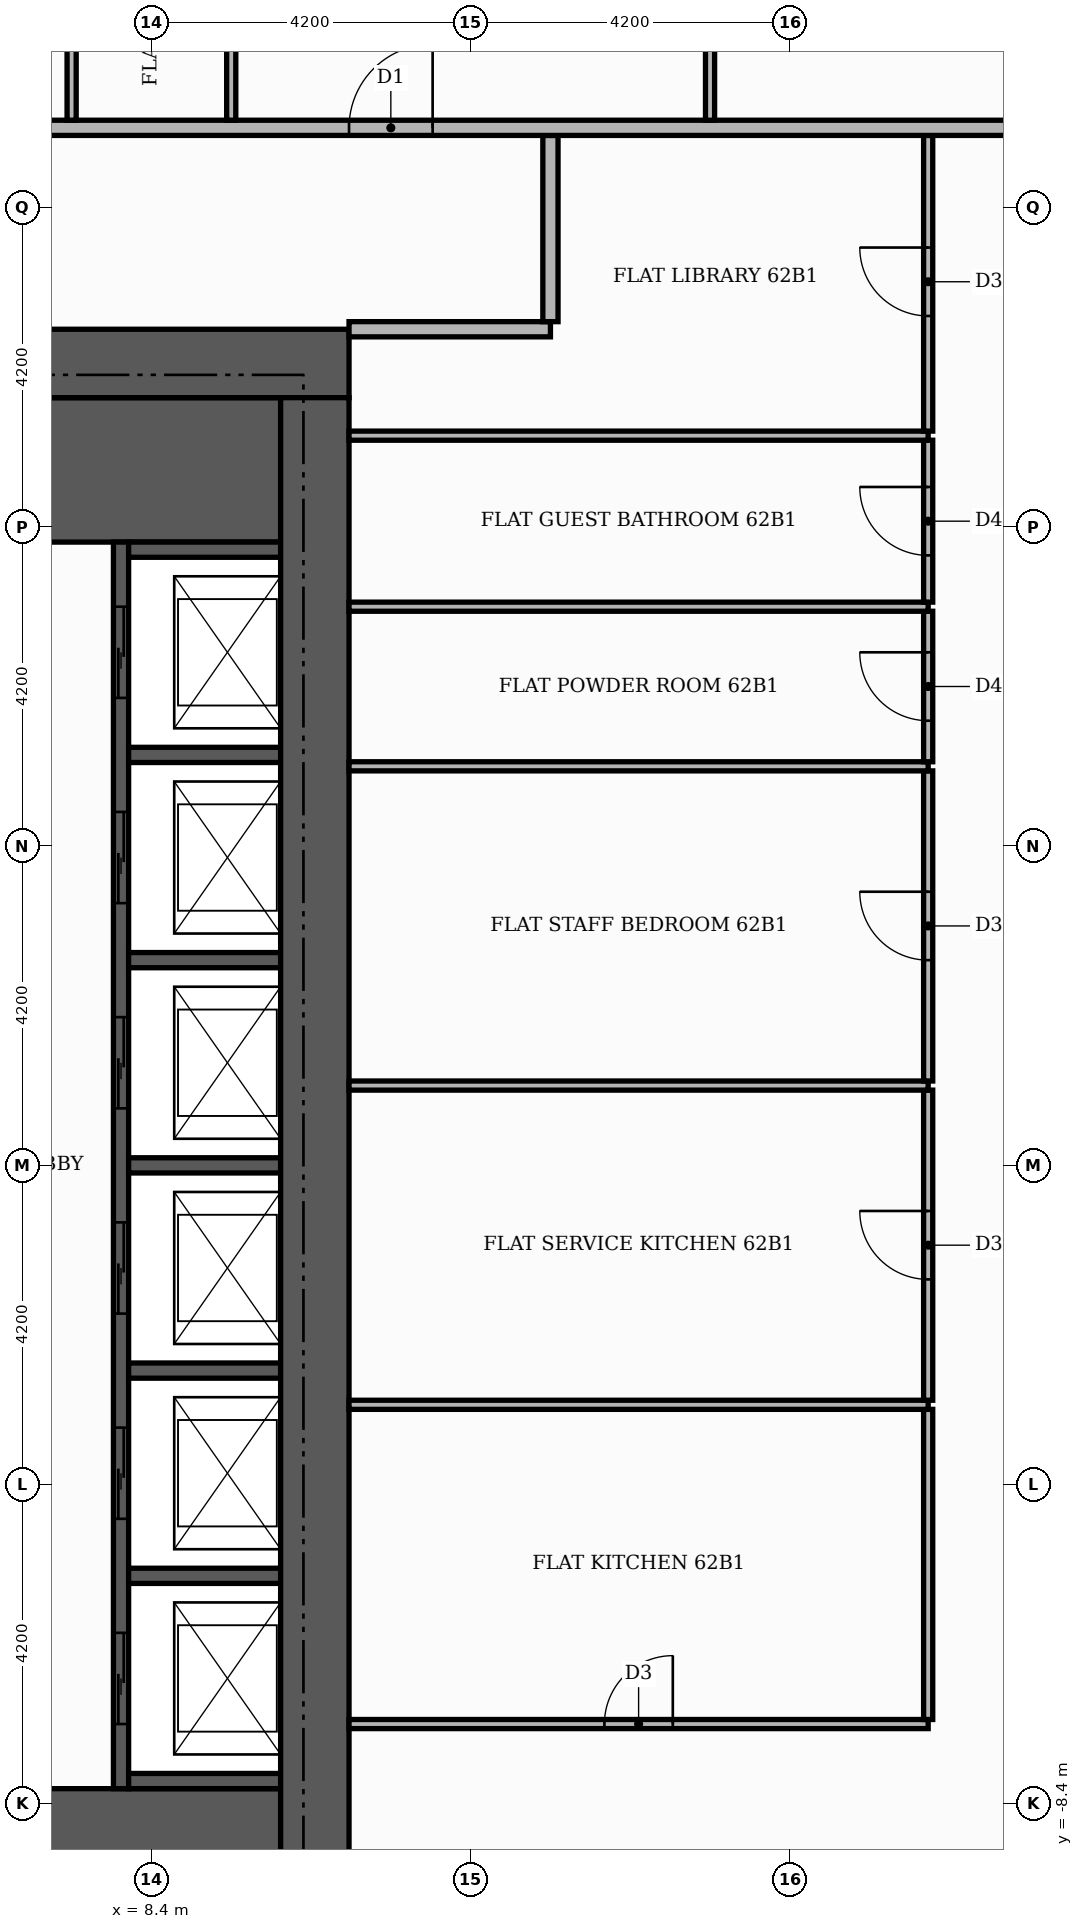
"""IFC4 building model, lengths in metres.
Left out: names, types, materials, properties, quantities, classifications, styles, units other than length and angle.
Written with IfcOpenShell. Run it as: python <this file> out.ifc"""

import sys

from ifc_helpers import new_model, si_unit, direction, frame, frame_2d, origin, place, context, subcontext, project, spatial, rectangle, extrude, element, fill, save


model = new_model("IFC4")
c1 = context("Model", 3, precision=1e-05, world=origin(), true_north=direction((0.0, 1.0)))
c2 = subcontext(c1, "Body", "Model", "MODEL_VIEW")
j1 = project(units=[si_unit("LENGTHUNIT", "METRE"), si_unit("PLANEANGLEUNIT", "RADIAN")], contexts=[c1])
p1 = place(None, origin())
s1 = spatial("IfcSite", under=j1, at=p1, CompositionType="ELEMENT")
p2 = place(p1, origin())
s2 = spatial("IfcBuilding", under=s1, at=p2, CompositionType="ELEMENT")
p3 = place(p2, frame((0.0, 0.0, 260.1)))
s3 = spatial("IfcBuildingStorey", under=s2, at=p3, CompositionType="ELEMENT", Elevation=260.1)
for number, where, z_axis, x_axis in (
    (1, (5.5, -9.15, 0.0), (0.0, 0.0, 1.0), (1.0, 0.0, 0.0)),
    (2, (5.5, 9.15, 0.0), (0.0, 0.0, 1.0), (1.0, 0.0, 0.0)),
):
    element("IfcWall", number, at=place(p3, frame(where, z_axis=z_axis, x_axis=x_axis)), inside=s3, PredefinedType="SHEAR", context=c2, shape_type="SweptSolid", body=[
        extrude(rectangle(XDim=4.6, YDim=1.9, at=frame_2d((2.3, 0.0))), origin(), (0.0, 0.0, 1.0), 3.48),
    ])
p4 = place(p3, frame((8.0, -8.2, 0.0), z_axis=(0.0, 0.0, 1.0), x_axis=(0.0, 1.0, 0.0)))
e3 = element("IfcWall", 3, at=p4, inside=s3, PredefinedType="SHEAR", context=c2, shape_type="SweptSolid", body=[
    extrude(rectangle(XDim=16.4, YDim=0.2, at=frame_2d((8.2, 0.0))), origin(), (0.0, 0.0, 1.0), 3.48),
])
p5 = place(p4, frame((0.85, 0.0, 0.0)))
e4 = element("IfcOpeningElement", 4, at=p5, cuts=e3, PredefinedType="OPENING", context=c2, shape_type="SweptSolid", body=[
    extrude(rectangle(XDim=1.2, YDim=2.1, at=frame_2d((0.6, 1.05))), frame((0.0, 0.11, 0.0), z_axis=(0.0, -1.0, 0.0), x_axis=(1.0, 0.0, 0.0)), (0.0, 0.0, 1.0), 0.22),
])
p6 = place(p4, frame((3.55, 0.0, 0.0)))
e5 = element("IfcOpeningElement", 5, at=p6, cuts=e3, PredefinedType="OPENING", context=c2, shape_type="SweptSolid", body=[
    extrude(rectangle(XDim=1.2, YDim=2.1, at=frame_2d((0.6, 1.05))), frame((0.0, 0.11, 0.0), z_axis=(0.0, -1.0, 0.0), x_axis=(1.0, 0.0, 0.0)), (0.0, 0.0, 1.0), 0.22),
])
p7 = place(p4, frame((6.25, 0.0, 0.0)))
e6 = element("IfcOpeningElement", 6, at=p7, cuts=e3, PredefinedType="OPENING", context=c2, shape_type="SweptSolid", body=[
    extrude(rectangle(XDim=1.2, YDim=2.1, at=frame_2d((0.6, 1.05))), frame((0.0, 0.11, 0.0), z_axis=(0.0, -1.0, 0.0), x_axis=(1.0, 0.0, 0.0)), (0.0, 0.0, 1.0), 0.22),
])
p8 = place(p4, frame((8.95, 0.0, 0.0)))
e7 = element("IfcOpeningElement", 7, at=p8, cuts=e3, PredefinedType="OPENING", context=c2, shape_type="SweptSolid", body=[
    extrude(rectangle(XDim=1.2, YDim=2.1, at=frame_2d((0.6, 1.05))), frame((0.0, 0.11, 0.0), z_axis=(0.0, -1.0, 0.0), x_axis=(1.0, 0.0, 0.0)), (0.0, 0.0, 1.0), 0.22),
])
p9 = place(p4, frame((11.65, 0.0, 0.0)))
e8 = element("IfcOpeningElement", 8, at=p9, cuts=e3, PredefinedType="OPENING", context=c2, shape_type="SweptSolid", body=[
    extrude(rectangle(XDim=1.2, YDim=2.1, at=frame_2d((0.6, 1.05))), frame((0.0, 0.11, 0.0), z_axis=(0.0, -1.0, 0.0), x_axis=(1.0, 0.0, 0.0)), (0.0, 0.0, 1.0), 0.22),
])
p10 = place(p4, frame((14.35, 0.0, 0.0)))
e9 = element("IfcOpeningElement", 9, at=p10, cuts=e3, PredefinedType="OPENING", context=c2, shape_type="SweptSolid", body=[
    extrude(rectangle(XDim=1.2, YDim=2.1, at=frame_2d((0.6, 1.05))), frame((0.0, 0.11, 0.0), z_axis=(0.0, -1.0, 0.0), x_axis=(1.0, 0.0, 0.0)), (0.0, 0.0, 1.0), 0.22),
])
for number, where, z_axis, x_axis in (
    (10, (8.1, -8.1, 0.0), (0.0, 0.0, 1.0), (1.0, 0.0, 0.0)),
    (11, (8.1, -5.4, 0.0), (0.0, 0.0, 1.0), (1.0, 0.0, 0.0)),
    (12, (8.1, -2.7, 0.0), (0.0, 0.0, 1.0), (1.0, 0.0, 0.0)),
    (13, (8.1, 0.0, 0.0), (0.0, 0.0, 1.0), (1.0, 0.0, 0.0)),
    (14, (8.1, 2.7, 0.0), (0.0, 0.0, 1.0), (1.0, 0.0, 0.0)),
    (15, (8.1, 5.4, 0.0), (0.0, 0.0, 1.0), (1.0, 0.0, 0.0)),
    (16, (8.1, 8.1, 0.0), (0.0, 0.0, 1.0), (1.0, 0.0, 0.0)),
):
    element("IfcWall", number, at=place(p3, frame(where, z_axis=z_axis, x_axis=x_axis)), inside=s3, PredefinedType="SHEAR", context=c2, shape_type="SweptSolid", body=[
        extrude(rectangle(XDim=2.0, YDim=0.2, at=frame_2d((1.0, 0.0))), origin(), (0.0, 0.0, 1.0), 3.48),
    ])
p11 = place(p3, frame((-11.0, 10.55, 0.0), z_axis=(0.0, 0.0, 1.0), x_axis=(1.0, 0.0, 0.0)))
e17 = element("IfcWall", 17, at=p11, inside=s3, PredefinedType="SHEAR", context=c2, shape_type="SweptSolid", body=[
    extrude(rectangle(XDim=22.0, YDim=0.9, at=frame_2d((11.0, 0.0))), origin(), (0.0, 0.0, 1.0), 3.48),
])
p12 = place(p11, frame((13.3, 0.0, 0.0)))
e18 = element("IfcOpeningElement", 18, at=p12, cuts=e17, PredefinedType="OPENING", context=c2, shape_type="SweptSolid", body=[
    extrude(rectangle(XDim=1.8, YDim=2.2, at=frame_2d((0.9, 1.1))), frame((0.0, 0.46, 0.0), z_axis=(0.0, -1.0, 0.0), x_axis=(1.0, 0.0, 0.0)), (0.0, 0.0, 1.0), 0.92),
])
p13 = place(p3, frame((10.55, -10.1, 0.0), z_axis=(0.0, 0.0, 1.0), x_axis=(0.0, 1.0, 0.0)))
e19 = element("IfcWall", 19, at=p13, inside=s3, PredefinedType="SHEAR", context=c2, shape_type="SweptSolid", body=[
    extrude(rectangle(XDim=20.2, YDim=0.9, at=frame_2d((10.1, 0.0))), origin(), (0.0, 0.0, 1.0), 3.48),
])
p14 = place(p3, frame((11.0, -7.35, 0.0), z_axis=(0.0, 0.0, 1.0), x_axis=(1.0, 0.0, 0.0)))
e20 = element("IfcWall", 20, at=p14, inside=s3, PredefinedType="PARTITIONING", context=c2, shape_type="SweptSolid", body=[
    extrude(rectangle(XDim=7.62, YDim=0.12, at=frame_2d((3.81, 0.0))), origin(), (0.0, 0.0, 1.0), 3.48),
])
p15 = place(p14, frame((3.36, 0.0, 0.0)))
e21 = element("IfcOpeningElement", 21, at=p15, cuts=e20, PredefinedType="OPENING", context=c2, shape_type="SweptSolid", body=[
    extrude(rectangle(XDim=0.9, YDim=2.1, at=frame_2d((0.45, 1.05))), frame((0.0, 0.07, 0.0), z_axis=(0.0, -1.0, 0.0), x_axis=(1.0, 0.0, 0.0)), (0.0, 0.0, 1.0), 0.14),
])
p16 = place(p3, frame((18.62, -7.29, 0.0), z_axis=(0.0, 0.0, 1.0), x_axis=(0.0, 1.0, 0.0)))
e22 = element("IfcWall", 22, at=p16, inside=s3, PredefinedType="PARTITIONING", context=c2, shape_type="SweptSolid", body=[
    extrude(rectangle(XDim=4.08, YDim=0.12, at=frame_2d((2.04, 0.0))), origin(), (0.0, 0.0, 1.0), 3.48),
])
p17 = place(p3, frame((11.0, -3.15, 0.0), z_axis=(0.0, 0.0, 1.0), x_axis=(1.0, 0.0, 0.0)))
e23 = element("IfcWall", 23, at=p17, inside=s3, PredefinedType="PARTITIONING", context=c2, shape_type="SweptSolid", body=[
    extrude(rectangle(XDim=7.62, YDim=0.12, at=frame_2d((3.81, 0.0))), origin(), (0.0, 0.0, 1.0), 3.48),
])
p18 = place(p3, frame((18.62, -3.09, 0.0), z_axis=(0.0, 0.0, 1.0), x_axis=(0.0, 1.0, 0.0)))
e24 = element("IfcWall", 24, at=p18, inside=s3, PredefinedType="PARTITIONING", context=c2, shape_type="SweptSolid", body=[
    extrude(rectangle(XDim=4.08, YDim=0.12, at=frame_2d((2.04, 0.0))), origin(), (0.0, 0.0, 1.0), 3.48),
])
p19 = place(p18, frame((1.59, 0.0, 0.0)))
e25 = element("IfcOpeningElement", 25, at=p19, cuts=e24, PredefinedType="OPENING", context=c2, shape_type="SweptSolid", body=[
    extrude(rectangle(XDim=0.9, YDim=2.1, at=frame_2d((0.45, 1.05))), frame((0.0, 0.07, 0.0), z_axis=(0.0, -1.0, 0.0), x_axis=(1.0, 0.0, 0.0)), (0.0, 0.0, 1.0), 0.14),
])
p20 = place(p3, frame((11.0, 1.05, 0.0), z_axis=(0.0, 0.0, 1.0), x_axis=(1.0, 0.0, 0.0)))
e26 = element("IfcWall", 26, at=p20, inside=s3, PredefinedType="PARTITIONING", context=c2, shape_type="SweptSolid", body=[
    extrude(rectangle(XDim=7.62, YDim=0.12, at=frame_2d((3.81, 0.0))), origin(), (0.0, 0.0, 1.0), 3.48),
])
p21 = place(p3, frame((18.62, 1.11, 0.0), z_axis=(0.0, 0.0, 1.0), x_axis=(0.0, 1.0, 0.0)))
e27 = element("IfcWall", 27, at=p21, inside=s3, PredefinedType="PARTITIONING", context=c2, shape_type="SweptSolid", body=[
    extrude(rectangle(XDim=4.08, YDim=0.12, at=frame_2d((2.04, 0.0))), origin(), (0.0, 0.0, 1.0), 3.48),
])
p22 = place(p21, frame((1.59, 0.0, 0.0)))
e28 = element("IfcOpeningElement", 28, at=p22, cuts=e27, PredefinedType="OPENING", context=c2, shape_type="SweptSolid", body=[
    extrude(rectangle(XDim=0.9, YDim=2.1, at=frame_2d((0.45, 1.05))), frame((0.0, 0.07, 0.0), z_axis=(0.0, -1.0, 0.0), x_axis=(1.0, 0.0, 0.0)), (0.0, 0.0, 1.0), 0.14),
])
p23 = place(p3, frame((11.0, 5.25, 0.0), z_axis=(0.0, 0.0, 1.0), x_axis=(1.0, 0.0, 0.0)))
e29 = element("IfcWall", 29, at=p23, inside=s3, PredefinedType="PARTITIONING", context=c2, shape_type="SweptSolid", body=[
    extrude(rectangle(XDim=7.62, YDim=0.12, at=frame_2d((3.81, 0.0))), origin(), (0.0, 0.0, 1.0), 3.48),
])
p24 = place(p3, frame((18.62, 5.31, 0.0), z_axis=(0.0, 0.0, 1.0), x_axis=(0.0, 1.0, 0.0)))
e30 = element("IfcWall", 30, at=p24, inside=s3, PredefinedType="PARTITIONING", context=c2, shape_type="SweptSolid", body=[
    extrude(rectangle(XDim=1.98, YDim=0.12, at=frame_2d((0.99, 0.0))), origin(), (0.0, 0.0, 1.0), 3.48),
])
p25 = place(p24, frame((0.54, 0.0, 0.0)))
e31 = element("IfcOpeningElement", 31, at=p25, cuts=e30, PredefinedType="OPENING", context=c2, shape_type="SweptSolid", body=[
    extrude(rectangle(XDim=0.9, YDim=2.1, at=frame_2d((0.45, 1.05))), frame((0.0, 0.07, 0.0), z_axis=(0.0, -1.0, 0.0), x_axis=(1.0, 0.0, 0.0)), (0.0, 0.0, 1.0), 0.14),
])
p26 = place(p3, frame((11.0, 7.35, 0.0), z_axis=(0.0, 0.0, 1.0), x_axis=(1.0, 0.0, 0.0)))
e32 = element("IfcWall", 32, at=p26, inside=s3, PredefinedType="PARTITIONING", context=c2, shape_type="SweptSolid", body=[
    extrude(rectangle(XDim=7.62, YDim=0.12, at=frame_2d((3.81, 0.0))), origin(), (0.0, 0.0, 1.0), 3.48),
])
p27 = place(p3, frame((18.62, 7.41, 0.0), z_axis=(0.0, 0.0, 1.0), x_axis=(0.0, 1.0, 0.0)))
e33 = element("IfcWall", 33, at=p27, inside=s3, PredefinedType="PARTITIONING", context=c2, shape_type="SweptSolid", body=[
    extrude(rectangle(XDim=2.13, YDim=0.12, at=frame_2d((1.065, 0.0))), origin(), (0.0, 0.0, 1.0), 3.48),
])
p28 = place(p27, frame((0.615, 0.0, 0.0)))
e34 = element("IfcOpeningElement", 34, at=p28, cuts=e33, PredefinedType="OPENING", context=c2, shape_type="SweptSolid", body=[
    extrude(rectangle(XDim=0.9, YDim=2.1, at=frame_2d((0.45, 1.05))), frame((0.0, 0.07, 0.0), z_axis=(0.0, -1.0, 0.0), x_axis=(1.0, 0.0, 0.0)), (0.0, 0.0, 1.0), 0.14),
])
p29 = place(p3, frame((11.0, 9.6, 0.0), z_axis=(0.0, 0.0, 1.0), x_axis=(1.0, 0.0, 0.0)))
e35 = element("IfcWall", 35, at=p29, inside=s3, PredefinedType="PARTITIONING", context=c2, shape_type="SweptSolid", body=[
    extrude(rectangle(XDim=7.62, YDim=0.12, at=frame_2d((3.81, 0.0))), origin(), (0.0, 0.0, 1.0), 3.48),
])
p30 = place(p3, frame((18.62, 9.66, 0.0), z_axis=(0.0, 0.0, 1.0), x_axis=(0.0, 1.0, 0.0)))
e36 = element("IfcWall", 36, at=p30, inside=s3, PredefinedType="PARTITIONING", context=c2, shape_type="SweptSolid", body=[
    extrude(rectangle(XDim=3.89, YDim=0.12, at=frame_2d((1.945, 0.0))), origin(), (0.0, 0.0, 1.0), 3.48),
])
p31 = place(p30, frame((1.515, 0.0, 0.0)))
e37 = element("IfcOpeningElement", 37, at=p31, cuts=e36, PredefinedType="OPENING", context=c2, shape_type="SweptSolid", body=[
    extrude(rectangle(XDim=0.9, YDim=2.1, at=frame_2d((0.45, 1.05))), frame((0.0, 0.07, 0.0), z_axis=(0.0, -1.0, 0.0), x_axis=(1.0, 0.0, 0.0)), (0.0, 0.0, 1.0), 0.14),
])
p32 = place(p3, frame((11.0, 11.0, 0.0), z_axis=(0.0, 0.0, 1.0), x_axis=(1.0, 0.0, 0.0)))
e38 = element("IfcWall", 38, at=p32, inside=s3, PredefinedType="PARTITIONING", context=c2, shape_type="SweptSolid", body=[
    extrude(rectangle(XDim=2.65, YDim=0.2, at=frame_2d((1.325, 0.0))), origin(), (0.0, 0.0, 1.0), 3.48),
])
p33 = place(p3, frame((13.65, 11.1, 0.0), z_axis=(0.0, 0.0, 1.0), x_axis=(0.0, 1.0, 0.0)))
e39 = element("IfcWall", 39, at=p33, inside=s3, PredefinedType="PARTITIONING", context=c2, shape_type="SweptSolid", body=[
    extrude(rectangle(XDim=2.45, YDim=0.2, at=frame_2d((1.225, 0.0))), origin(), (0.0, 0.0, 1.0), 3.48),
])
p34 = place(p3, frame((-13.65, 13.65, 0.0), z_axis=(0.0, 0.0, 1.0), x_axis=(1.0, 0.0, 0.0)))
e40 = element("IfcWall", 40, at=p34, inside=s3, PredefinedType="PARTITIONING", context=c2, shape_type="SweptSolid", body=[
    extrude(rectangle(XDim=39.07, YDim=0.2, at=frame_2d((19.535, 0.0))), origin(), (0.0, 0.0, 1.0), 3.48),
])
p35 = place(p34, frame((24.65, 0.0, 0.0)))
e41 = element("IfcOpeningElement", 41, at=p35, cuts=e40, PredefinedType="OPENING", context=c2, shape_type="SweptSolid", body=[
    extrude(rectangle(XDim=1.1, YDim=2.4, at=frame_2d((0.55, 1.2))), frame((0.0, 0.11, 0.0), z_axis=(0.0, -1.0, 0.0), x_axis=(1.0, 0.0, 0.0)), (0.0, 0.0, 1.0), 0.22),
])
p36 = place(p34, frame((14.15, 0.0, 0.0)))
e42 = element("IfcOpeningElement", 42, at=p36, cuts=e40, PredefinedType="OPENING", context=c2, shape_type="SweptSolid", body=[
    extrude(rectangle(XDim=1.1, YDim=2.4, at=frame_2d((0.55, 1.2))), frame((0.0, 0.11, 0.0), z_axis=(0.0, -1.0, 0.0), x_axis=(1.0, 0.0, 0.0)), (0.0, 0.0, 1.0), 0.22),
])
p37 = place(p3, frame((7.35, 13.75, 0.0), z_axis=(0.0, 0.0, 1.0), x_axis=(0.0, 1.0, 0.0)))
e43 = element("IfcWall", 43, at=p37, inside=s3, PredefinedType="PARTITIONING", context=c2, shape_type="SweptSolid", body=[
    extrude(rectangle(XDim=5.11, YDim=0.12, at=frame_2d((2.555, 0.0))), origin(), (0.0, 0.0, 1.0), 3.48),
])
p38 = place(p3, frame((9.45, 13.75, 0.0), z_axis=(0.0, 0.0, 1.0), x_axis=(0.0, 1.0, 0.0)))
e44 = element("IfcWall", 44, at=p38, inside=s3, PredefinedType="PARTITIONING", context=c2, shape_type="SweptSolid", body=[
    extrude(rectangle(XDim=5.11, YDim=0.12, at=frame_2d((2.555, 0.0))), origin(), (0.0, 0.0, 1.0), 3.48),
])
p39 = place(p38, frame((2.085, 0.0, 0.0)))
e45 = element("IfcOpeningElement", 45, at=p39, cuts=e44, PredefinedType="OPENING", context=c2, shape_type="SweptSolid", body=[
    extrude(rectangle(XDim=0.9, YDim=2.1, at=frame_2d((0.45, 1.05))), frame((0.0, 0.07, 0.0), z_axis=(0.0, -1.0, 0.0), x_axis=(1.0, 0.0, 0.0)), (0.0, 0.0, 1.0), 0.14),
])
p40 = place(p3, frame((15.75, 13.75, 0.0), z_axis=(0.0, 0.0, 1.0), x_axis=(0.0, 1.0, 0.0)))
e46 = element("IfcWall", 46, at=p40, inside=s3, PredefinedType="PARTITIONING", context=c2, shape_type="SweptSolid", body=[
    extrude(rectangle(XDim=6.61, YDim=0.12, at=frame_2d((3.305, 0.0))), origin(), (0.0, 0.0, 1.0), 3.48),
])
p41 = place(p40, frame((2.785, 0.0, 0.0)))
e47 = element("IfcOpeningElement", 47, at=p41, cuts=e46, PredefinedType="OPENING", context=c2, shape_type="SweptSolid", body=[
    extrude(rectangle(XDim=1.0, YDim=2.1, at=frame_2d((0.5, 1.05))), frame((0.0, 0.07, 0.0), z_axis=(0.0, -1.0, 0.0), x_axis=(1.0, 0.0, 0.0)), (0.0, 0.0, 1.0), 0.14),
])
p42 = place(p5, origin())
e48 = element("IfcDoor", 48, at=p42, inside=s3, OperationType="SLIDING_TO_LEFT", PredefinedType="DOOR", context=c2, shape_type="SweptSolid", body=[
    extrude(rectangle(XDim=1.2, YDim=2.1, at=frame_2d((0.6, 1.05))), frame((0.0, 0.025, 0.0), z_axis=(0.0, -1.0, 0.0), x_axis=(1.0, 0.0, 0.0)), (0.0, 0.0, 1.0), 0.05),
])
fill(e4, e48)
p43 = place(p6, origin())
e49 = element("IfcDoor", 49, at=p43, inside=s3, OperationType="SLIDING_TO_LEFT", PredefinedType="DOOR", context=c2, shape_type="SweptSolid", body=[
    extrude(rectangle(XDim=1.2, YDim=2.1, at=frame_2d((0.6, 1.05))), frame((0.0, 0.025, 0.0), z_axis=(0.0, -1.0, 0.0), x_axis=(1.0, 0.0, 0.0)), (0.0, 0.0, 1.0), 0.05),
])
fill(e5, e49)
p44 = place(p7, origin())
e50 = element("IfcDoor", 50, at=p44, inside=s3, OperationType="SLIDING_TO_LEFT", PredefinedType="DOOR", context=c2, shape_type="SweptSolid", body=[
    extrude(rectangle(XDim=1.2, YDim=2.1, at=frame_2d((0.6, 1.05))), frame((0.0, 0.025, 0.0), z_axis=(0.0, -1.0, 0.0), x_axis=(1.0, 0.0, 0.0)), (0.0, 0.0, 1.0), 0.05),
])
fill(e6, e50)
p45 = place(p8, origin())
e51 = element("IfcDoor", 51, at=p45, inside=s3, OperationType="SLIDING_TO_LEFT", PredefinedType="DOOR", context=c2, shape_type="SweptSolid", body=[
    extrude(rectangle(XDim=1.2, YDim=2.1, at=frame_2d((0.6, 1.05))), frame((0.0, 0.025, 0.0), z_axis=(0.0, -1.0, 0.0), x_axis=(1.0, 0.0, 0.0)), (0.0, 0.0, 1.0), 0.05),
])
fill(e7, e51)
p46 = place(p9, origin())
e52 = element("IfcDoor", 52, at=p46, inside=s3, OperationType="SLIDING_TO_LEFT", PredefinedType="DOOR", context=c2, shape_type="SweptSolid", body=[
    extrude(rectangle(XDim=1.2, YDim=2.1, at=frame_2d((0.6, 1.05))), frame((0.0, 0.025, 0.0), z_axis=(0.0, -1.0, 0.0), x_axis=(1.0, 0.0, 0.0)), (0.0, 0.0, 1.0), 0.05),
])
fill(e8, e52)
p47 = place(p10, origin())
e53 = element("IfcDoor", 53, at=p47, inside=s3, OperationType="SLIDING_TO_LEFT", PredefinedType="DOOR", context=c2, shape_type="SweptSolid", body=[
    extrude(rectangle(XDim=1.2, YDim=2.1, at=frame_2d((0.6, 1.05))), frame((0.0, 0.025, 0.0), z_axis=(0.0, -1.0, 0.0), x_axis=(1.0, 0.0, 0.0)), (0.0, 0.0, 1.0), 0.05),
])
fill(e9, e53)
p48 = place(p15, origin())
e54 = element("IfcDoor", 54, at=p48, inside=s3, OperationType="SINGLE_SWING_RIGHT", PredefinedType="DOOR", context=c2, shape_type="SweptSolid", body=[
    extrude(rectangle(XDim=0.9, YDim=2.1, at=frame_2d((0.45, 1.05))), frame((0.0, 0.025, 0.0), z_axis=(0.0, -1.0, 0.0), x_axis=(1.0, 0.0, 0.0)), (0.0, 0.0, 1.0), 0.05),
])
fill(e21, e54)
p49 = place(p19, origin())
e55 = element("IfcDoor", 55, at=p49, inside=s3, OperationType="SINGLE_SWING_RIGHT", PredefinedType="DOOR", context=c2, shape_type="SweptSolid", body=[
    extrude(rectangle(XDim=0.9, YDim=2.1, at=frame_2d((0.45, 1.05))), frame((0.0, 0.025, 0.0), z_axis=(0.0, -1.0, 0.0), x_axis=(1.0, 0.0, 0.0)), (0.0, 0.0, 1.0), 0.05),
])
fill(e25, e55)
p50 = place(p22, origin())
e56 = element("IfcDoor", 56, at=p50, inside=s3, OperationType="SINGLE_SWING_RIGHT", PredefinedType="DOOR", context=c2, shape_type="SweptSolid", body=[
    extrude(rectangle(XDim=0.9, YDim=2.1, at=frame_2d((0.45, 1.05))), frame((0.0, 0.025, 0.0), z_axis=(0.0, -1.0, 0.0), x_axis=(1.0, 0.0, 0.0)), (0.0, 0.0, 1.0), 0.05),
])
fill(e28, e56)
p51 = place(p25, origin())
e57 = element("IfcDoor", 57, at=p51, inside=s3, OperationType="SINGLE_SWING_RIGHT", PredefinedType="DOOR", context=c2, shape_type="SweptSolid", body=[
    extrude(rectangle(XDim=0.9, YDim=2.1, at=frame_2d((0.45, 1.05))), frame((0.0, 0.025, 0.0), z_axis=(0.0, -1.0, 0.0), x_axis=(1.0, 0.0, 0.0)), (0.0, 0.0, 1.0), 0.05),
])
fill(e31, e57)
p52 = place(p28, origin())
e58 = element("IfcDoor", 58, at=p52, inside=s3, OperationType="SINGLE_SWING_RIGHT", PredefinedType="DOOR", context=c2, shape_type="SweptSolid", body=[
    extrude(rectangle(XDim=0.9, YDim=2.1, at=frame_2d((0.45, 1.05))), frame((0.0, 0.025, 0.0), z_axis=(0.0, -1.0, 0.0), x_axis=(1.0, 0.0, 0.0)), (0.0, 0.0, 1.0), 0.05),
])
fill(e34, e58)
p53 = place(p31, origin())
e59 = element("IfcDoor", 59, at=p53, inside=s3, OperationType="SINGLE_SWING_RIGHT", PredefinedType="DOOR", context=c2, shape_type="SweptSolid", body=[
    extrude(rectangle(XDim=0.9, YDim=2.1, at=frame_2d((0.45, 1.05))), frame((0.0, 0.025, 0.0), z_axis=(0.0, -1.0, 0.0), x_axis=(1.0, 0.0, 0.0)), (0.0, 0.0, 1.0), 0.05),
])
fill(e37, e59)
p54 = place(p35, origin())
e60 = element("IfcDoor", 60, at=p54, inside=s3, OperationType="SINGLE_SWING_RIGHT", PredefinedType="DOOR", context=c2, shape_type="SweptSolid", body=[
    extrude(rectangle(XDim=1.1, YDim=2.4, at=frame_2d((0.55, 1.2))), frame((0.0, 0.025, 0.0), z_axis=(0.0, -1.0, 0.0), x_axis=(1.0, 0.0, 0.0)), (0.0, 0.0, 1.0), 0.05),
])
fill(e41, e60)
save(model, sys.argv[1])
